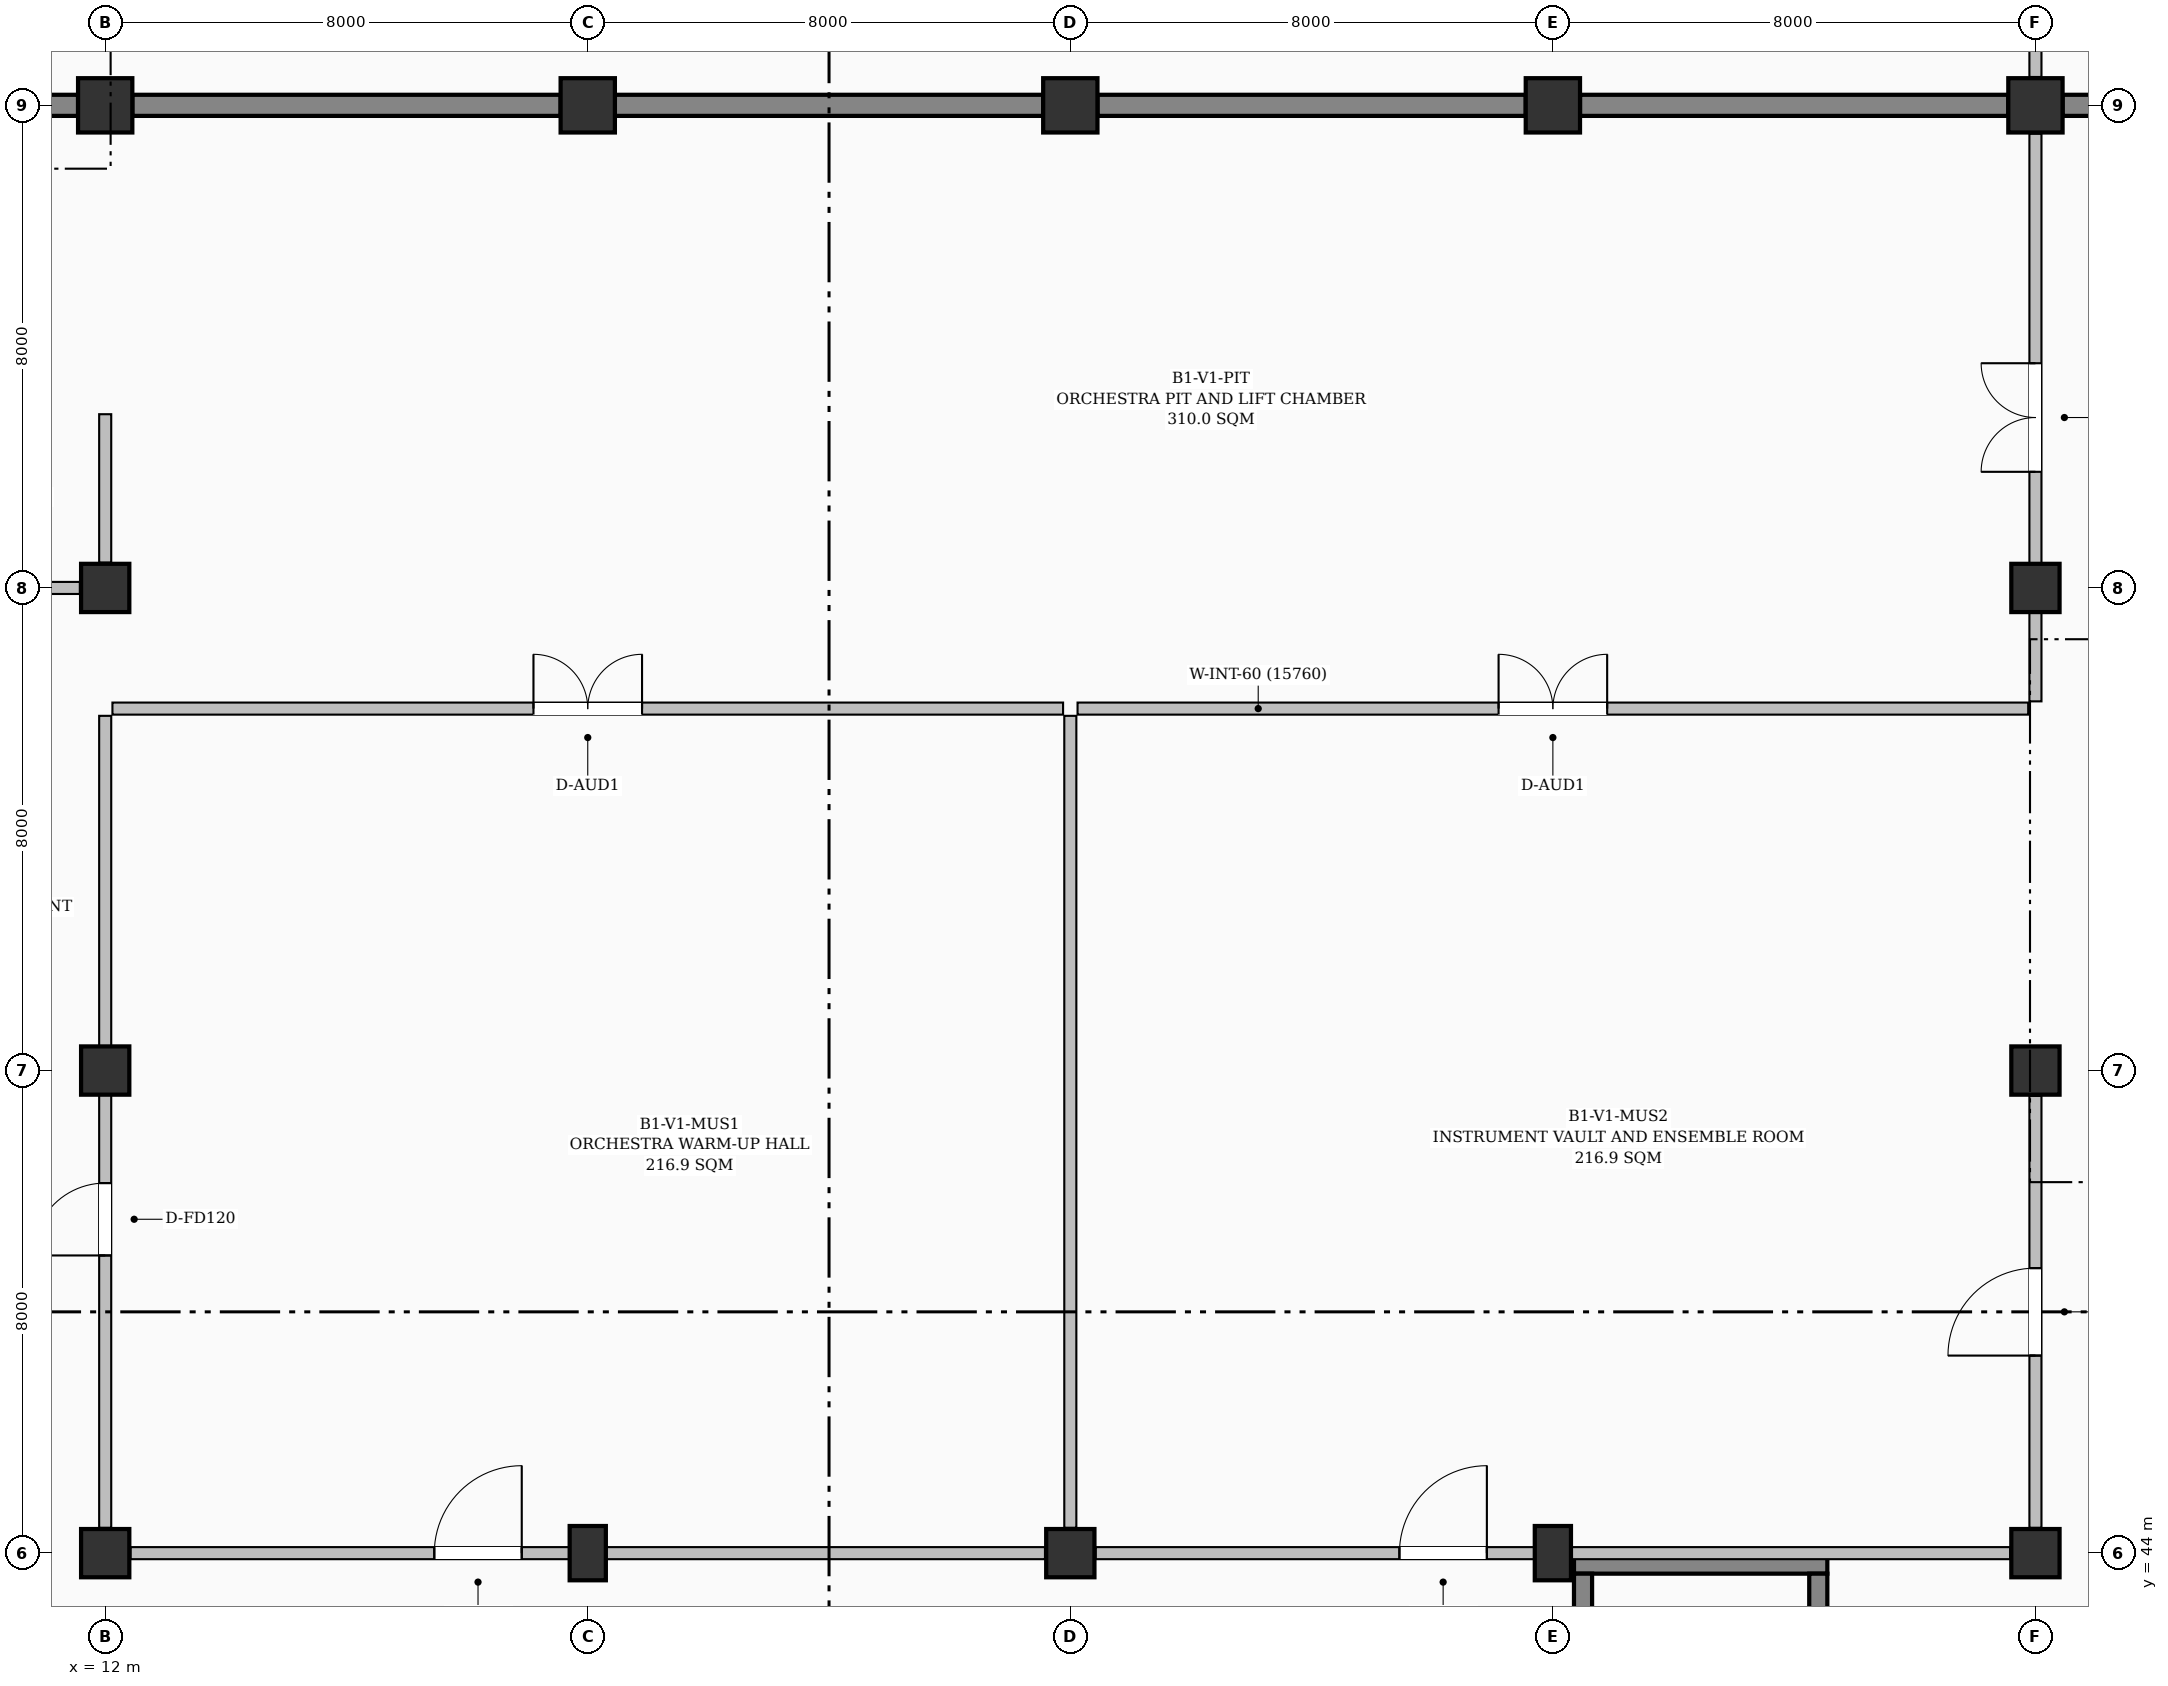
"""IFC4 building model, lengths in metres.
Left out: names, types, materials, properties, quantities, classifications, styles, units other than length and angle.
Written with IfcOpenShell. Run it as: python <this file> out.ifc"""

import sys

from ifc_helpers import new_model, si_unit, direction, frame, frame_2d, origin, origin_2d, place, context, subcontext, project, spatial, rectangle, extrude, element, fill, save


model = new_model("IFC4")
c1 = context("Model", 3, precision=1e-05, world=origin(), true_north=direction((0.0, 1.0)))
c2 = subcontext(c1, "Body", "Model", "MODEL_VIEW")
j1 = project(units=[si_unit("LENGTHUNIT", "METRE"), si_unit("PLANEANGLEUNIT", "RADIAN")], contexts=[c1])
p1 = place(None, origin())
s1 = spatial("IfcSite", under=j1, at=p1, CompositionType="ELEMENT")
p2 = place(p1, origin())
s2 = spatial("IfcBuilding", under=s1, at=p2, CompositionType="ELEMENT")
p3 = place(p2, frame((0.0, 0.0, -4.8)))
s3 = spatial("IfcBuildingStorey", under=s2, at=p3, CompositionType="ELEMENT", Elevation=-4.8)
for number, where, z_axis, x_axis in (
    (1, (12.0, 44.0, -0.38), (0.0, 0.0, 1.0), (1.0, 0.0, 0.0)),
    (2, (12.0, 52.0, -0.38), (0.0, 0.0, 1.0), (1.0, 0.0, 0.0)),
    (3, (12.0, 60.0, -0.38), (0.0, 0.0, 1.0), (1.0, 0.0, 0.0)),
):
    element("IfcColumn", number, at=place(p3, frame(where, z_axis=z_axis, x_axis=x_axis)), inside=s3, PredefinedType="COLUMN", context=c2, shape_type="SweptSolid", body=[
        extrude(rectangle(XDim=0.8, YDim=0.8, at=origin_2d()), origin(), (0.0, 0.0, 1.0), 5.18),
    ])
p4 = place(p3, frame((12.0, 68.0, -0.38), z_axis=(0.0, 0.0, 1.0), x_axis=(1.0, 0.0, 0.0)))
e4 = element("IfcColumn", 4, at=p4, inside=s3, PredefinedType="COLUMN", context=c2, shape_type="SweptSolid", body=[
    extrude(rectangle(XDim=0.9, YDim=0.9, at=origin_2d()), origin(), (0.0, 0.0, 1.0), 5.18),
])
p5 = place(p3, frame((20.0, 44.0, -0.38), z_axis=(0.0, 0.0, 1.0), x_axis=(1.0, 0.0, 0.0)))
e5 = element("IfcColumn", 5, at=p5, inside=s3, PredefinedType="COLUMN", context=c2, shape_type="SweptSolid", body=[
    extrude(rectangle(XDim=0.6, YDim=0.9, at=origin_2d()), origin(), (0.0, 0.0, 1.0), 5.18),
])
p6 = place(p3, frame((20.0, 68.0, -0.38), z_axis=(0.0, 0.0, 1.0), x_axis=(1.0, 0.0, 0.0)))
e6 = element("IfcColumn", 6, at=p6, inside=s3, PredefinedType="COLUMN", context=c2, shape_type="SweptSolid", body=[
    extrude(rectangle(XDim=0.9, YDim=0.9, at=origin_2d()), origin(), (0.0, 0.0, 1.0), 5.18),
])
p7 = place(p3, frame((28.0, 44.0, -0.38), z_axis=(0.0, 0.0, 1.0), x_axis=(1.0, 0.0, 0.0)))
e7 = element("IfcColumn", 7, at=p7, inside=s3, PredefinedType="COLUMN", context=c2, shape_type="SweptSolid", body=[
    extrude(rectangle(XDim=0.8, YDim=0.8, at=origin_2d()), origin(), (0.0, 0.0, 1.0), 5.18),
])
p8 = place(p3, frame((28.0, 68.0, -0.38), z_axis=(0.0, 0.0, 1.0), x_axis=(1.0, 0.0, 0.0)))
e8 = element("IfcColumn", 8, at=p8, inside=s3, PredefinedType="COLUMN", context=c2, shape_type="SweptSolid", body=[
    extrude(rectangle(XDim=0.9, YDim=0.9, at=origin_2d()), origin(), (0.0, 0.0, 1.0), 5.18),
])
p9 = place(p3, frame((36.0, 44.0, -0.38), z_axis=(0.0, 0.0, 1.0), x_axis=(1.0, 0.0, 0.0)))
e9 = element("IfcColumn", 9, at=p9, inside=s3, PredefinedType="COLUMN", context=c2, shape_type="SweptSolid", body=[
    extrude(rectangle(XDim=0.6, YDim=0.9, at=origin_2d()), origin(), (0.0, 0.0, 1.0), 5.18),
])
p10 = place(p3, frame((36.0, 68.0, -0.38), z_axis=(0.0, 0.0, 1.0), x_axis=(1.0, 0.0, 0.0)))
e10 = element("IfcColumn", 10, at=p10, inside=s3, PredefinedType="COLUMN", context=c2, shape_type="SweptSolid", body=[
    extrude(rectangle(XDim=0.9, YDim=0.9, at=origin_2d()), origin(), (0.0, 0.0, 1.0), 5.18),
])
for number, where, z_axis, x_axis in (
    (11, (44.0, 44.0, -0.38), (0.0, 0.0, 1.0), (1.0, 0.0, 0.0)),
    (12, (44.0, 52.0, -0.38), (0.0, 0.0, 1.0), (1.0, 0.0, 0.0)),
    (13, (44.0, 60.0, -0.38), (0.0, 0.0, 1.0), (1.0, 0.0, 0.0)),
):
    element("IfcColumn", number, at=place(p3, frame(where, z_axis=z_axis, x_axis=x_axis)), inside=s3, PredefinedType="COLUMN", context=c2, shape_type="SweptSolid", body=[
        extrude(rectangle(XDim=0.8, YDim=0.8, at=origin_2d()), origin(), (0.0, 0.0, 1.0), 5.18),
    ])
p11 = place(p3, frame((44.0, 68.0, -0.38), z_axis=(0.0, 0.0, 1.0), x_axis=(1.0, 0.0, 0.0)))
e14 = element("IfcColumn", 14, at=p11, inside=s3, PredefinedType="COLUMN", context=c2, shape_type="SweptSolid", body=[
    extrude(rectangle(XDim=0.9, YDim=0.9, at=origin_2d()), origin(), (0.0, 0.0, 1.0), 5.18),
])
p12 = place(p3, frame((4.35, 68.0, 0.0), z_axis=(0.0, 0.0, 1.0), x_axis=(1.0, 0.0, 0.0)))
e15 = element("IfcWall", 15, at=p12, inside=s3, PredefinedType="SHEAR", context=c2, shape_type="SweptSolid", body=[
    extrude(rectangle(XDim=7.2, YDim=0.35, at=frame_2d((3.6, 0.0))), origin(), (0.0, 0.0, 1.0), 4.5),
])
for number, where, z_axis, x_axis in (
    (16, (12.45, 68.0, 0.0), (0.0, 0.0, 1.0), (1.0, 0.0, 0.0)),
    (17, (20.45, 68.0, 0.0), (0.0, 0.0, 1.0), (1.0, 0.0, 0.0)),
    (18, (28.45, 68.0, 0.0), (0.0, 0.0, 1.0), (1.0, 0.0, 0.0)),
    (19, (36.45, 68.0, 0.0), (0.0, 0.0, 1.0), (1.0, 0.0, 0.0)),
):
    element("IfcWall", number, at=place(p3, frame(where, z_axis=z_axis, x_axis=x_axis)), inside=s3, PredefinedType="SHEAR", context=c2, shape_type="SweptSolid", body=[
        extrude(rectangle(XDim=7.1, YDim=0.35, at=frame_2d((3.55, 0.0))), origin(), (0.0, 0.0, 1.0), 4.5),
    ])
p13 = place(p3, frame((44.45, 68.0, 0.0), z_axis=(0.0, 0.0, 1.0), x_axis=(1.0, 0.0, 0.0)))
e20 = element("IfcWall", 20, at=p13, inside=s3, PredefinedType="SHEAR", context=c2, shape_type="SweptSolid", body=[
    extrude(rectangle(XDim=7.2, YDim=0.35, at=frame_2d((3.6, 0.0))), origin(), (0.0, 0.0, 1.0), 4.5),
])
p14 = place(p3, frame((40.55, 43.81, -0.38), z_axis=(0.0, 0.0, 1.0), x_axis=(-1.0, 0.0, 0.0)))
e21 = element("IfcWall", 21, at=p14, inside=s3, PredefinedType="SHEAR", context=c2, shape_type="SweptSolid", body=[
    extrude(rectangle(XDim=4.2, YDim=0.3, at=frame_2d((2.1, 0.0))), origin(), (0.0, 0.0, 1.0), 4.88),
])
p15 = place(p3, frame((36.5, 36.34, -0.38), z_axis=(0.0, 0.0, 1.0), x_axis=(0.0, 1.0, 0.0)))
e22 = element("IfcWall", 22, at=p15, inside=s3, PredefinedType="SHEAR", context=c2, shape_type="SweptSolid", body=[
    extrude(rectangle(XDim=7.32, YDim=0.3, at=frame_2d((3.66, 0.0))), origin(), (0.0, 0.0, 1.0), 4.88),
])
p16 = place(p3, frame((40.4, 36.34, -0.38), z_axis=(0.0, 0.0, 1.0), x_axis=(0.0, 1.0, 0.0)))
e23 = element("IfcWall", 23, at=p16, inside=s3, PredefinedType="SHEAR", context=c2, shape_type="SweptSolid", body=[
    extrude(rectangle(XDim=7.32, YDim=0.3, at=frame_2d((3.66, 0.0))), origin(), (0.0, 0.0, 1.0), 4.88),
])
p17 = place(p16, frame((0.35, 0.0, 0.38)))
e24 = element("IfcOpeningElement", 24, at=p17, cuts=e23, PredefinedType="OPENING", context=c2, shape_type="SweptSolid", body=[
    extrude(rectangle(XDim=1.2, YDim=2.15, at=frame_2d((0.6, 1.075))), frame((0.0, 0.16, 0.0), z_axis=(0.0, -1.0, 0.0), x_axis=(1.0, 0.0, 0.0)), (0.0, 0.0, 1.0), 0.32),
])
p18 = place(p3, frame((12.12, 58.0, 0.0), z_axis=(0.0, 0.0, 1.0), x_axis=(1.0, 0.0, 0.0)))
e25 = element("IfcWall", 25, at=p18, inside=s3, PredefinedType="PARTITIONING", context=c2, shape_type="SweptSolid", body=[
    extrude(rectangle(XDim=15.76, YDim=0.2, at=frame_2d((7.88, 0.0))), origin(), (0.0, 0.0, 1.0), 4.5),
])
p19 = place(p18, frame((6.98, 0.0, 0.0)))
e26 = element("IfcOpeningElement", 26, at=p19, cuts=e25, PredefinedType="OPENING", context=c2, shape_type="SweptSolid", body=[
    extrude(rectangle(XDim=1.8, YDim=2.35, at=frame_2d((0.9, 1.175))), frame((0.0, 0.11, 0.0), z_axis=(0.0, -1.0, 0.0), x_axis=(1.0, 0.0, 0.0)), (0.0, 0.0, 1.0), 0.22),
])
p20 = place(p3, frame((28.12, 58.0, 0.0), z_axis=(0.0, 0.0, 1.0), x_axis=(1.0, 0.0, 0.0)))
e27 = element("IfcWall", 27, at=p20, inside=s3, PredefinedType="PARTITIONING", context=c2, shape_type="SweptSolid", body=[
    extrude(rectangle(XDim=15.76, YDim=0.2, at=frame_2d((7.88, 0.0))), origin(), (0.0, 0.0, 1.0), 4.5),
])
p21 = place(p20, frame((6.98, 0.0, 0.0)))
e28 = element("IfcOpeningElement", 28, at=p21, cuts=e27, PredefinedType="OPENING", context=c2, shape_type="SweptSolid", body=[
    extrude(rectangle(XDim=1.8, YDim=2.35, at=frame_2d((0.9, 1.175))), frame((0.0, 0.11, 0.0), z_axis=(0.0, -1.0, 0.0), x_axis=(1.0, 0.0, 0.0)), (0.0, 0.0, 1.0), 0.22),
])
p22 = place(p3, frame((12.0, 60.42, 0.0), z_axis=(0.0, 0.0, 1.0), x_axis=(0.0, 1.0, 0.0)))
e29 = element("IfcWall", 29, at=p22, inside=s3, PredefinedType="PARTITIONING", context=c2, shape_type="SweptSolid", body=[
    extrude(rectangle(XDim=2.46, YDim=0.2, at=frame_2d((1.23, 0.0))), origin(), (0.0, 0.0, 1.0), 4.125),
])
p23 = place(p3, frame((44.0, 58.12, 0.0), z_axis=(0.0, 0.0, 1.0), x_axis=(0.0, 1.0, 0.0)))
e30 = element("IfcWall", 30, at=p23, inside=s3, PredefinedType="PARTITIONING", context=c2, shape_type="SweptSolid", body=[
    extrude(rectangle(XDim=9.41, YDim=0.2, at=frame_2d((4.705, 0.0))), origin(), (0.0, 0.0, 1.0), 3.885),
])
p24 = place(p23, frame((3.805, 0.0, 0.0)))
e31 = element("IfcOpeningElement", 31, at=p24, cuts=e30, PredefinedType="OPENING", context=c2, shape_type="SweptSolid", body=[
    extrude(rectangle(XDim=1.8, YDim=2.35, at=frame_2d((0.9, 1.175))), frame((0.0, 0.11, 0.0), z_axis=(0.0, -1.0, 0.0), x_axis=(1.0, 0.0, 0.0)), (0.0, 0.0, 1.0), 0.22),
])
p25 = place(p3, frame((28.0, 44.42, 0.0), z_axis=(0.0, 0.0, 1.0), x_axis=(0.0, 1.0, 0.0)))
e32 = element("IfcWall", 32, at=p25, inside=s3, PredefinedType="PARTITIONING", context=c2, shape_type="SweptSolid", body=[
    extrude(rectangle(XDim=13.46, YDim=0.2, at=frame_2d((6.73, 0.0))), origin(), (0.0, 0.0, 1.0), 3.285),
])
p26 = place(p3, frame((12.42, 44.0, 0.0), z_axis=(0.0, 0.0, 1.0), x_axis=(1.0, 0.0, 0.0)))
e33 = element("IfcWall", 33, at=p26, inside=s3, PredefinedType="PARTITIONING", context=c2, shape_type="SweptSolid", body=[
    extrude(rectangle(XDim=15.16, YDim=0.2, at=frame_2d((7.58, 0.0))), origin(), (0.0, 0.0, 1.0), 3.735),
])
p27 = place(p26, frame((5.036, 0.0, 0.0)))
e34 = element("IfcOpeningElement", 34, at=p27, cuts=e33, PredefinedType="OPENING", context=c2, shape_type="SweptSolid", body=[
    extrude(rectangle(XDim=1.45, YDim=2.25, at=frame_2d((0.725, 1.125))), frame((0.0, 0.11, 0.0), z_axis=(0.0, -1.0, 0.0), x_axis=(1.0, 0.0, 0.0)), (0.0, 0.0, 1.0), 0.22),
])
p28 = place(p3, frame((12.0, 44.42, 0.0), z_axis=(0.0, 0.0, 1.0), x_axis=(0.0, 1.0, 0.0)))
e35 = element("IfcWall", 35, at=p28, inside=s3, PredefinedType="PARTITIONING", context=c2, shape_type="SweptSolid", body=[
    extrude(rectangle(XDim=13.46, YDim=0.2, at=frame_2d((6.73, 0.0))), origin(), (0.0, 0.0, 1.0), 4.035),
])
p29 = place(p28, frame((4.515, 0.0, 0.0)))
e36 = element("IfcOpeningElement", 36, at=p29, cuts=e35, PredefinedType="OPENING", context=c2, shape_type="SweptSolid", body=[
    extrude(rectangle(XDim=1.2, YDim=2.2, at=frame_2d((0.6, 1.1))), frame((0.0, 0.11, 0.0), z_axis=(0.0, -1.0, 0.0), x_axis=(1.0, 0.0, 0.0)), (0.0, 0.0, 1.0), 0.22),
])
p30 = place(p3, frame((28.42, 44.0, 0.0), z_axis=(0.0, 0.0, 1.0), x_axis=(1.0, 0.0, 0.0)))
e37 = element("IfcWall", 37, at=p30, inside=s3, PredefinedType="PARTITIONING", context=c2, shape_type="SweptSolid", body=[
    extrude(rectangle(XDim=15.16, YDim=0.2, at=frame_2d((7.58, 0.0))), origin(), (0.0, 0.0, 1.0), 3.635),
])
p31 = place(p30, frame((5.036, 0.0, 0.0)))
e38 = element("IfcOpeningElement", 38, at=p31, cuts=e37, PredefinedType="OPENING", context=c2, shape_type="SweptSolid", body=[
    extrude(rectangle(XDim=1.45, YDim=2.25, at=frame_2d((0.725, 1.125))), frame((0.0, 0.11, 0.0), z_axis=(0.0, -1.0, 0.0), x_axis=(1.0, 0.0, 0.0)), (0.0, 0.0, 1.0), 0.22),
])
p32 = place(p3, frame((44.0, 44.42, 0.0), z_axis=(0.0, 0.0, 1.0), x_axis=(0.0, 1.0, 0.0)))
e39 = element("IfcWall", 39, at=p32, inside=s3, PredefinedType="PARTITIONING", context=c2, shape_type="SweptSolid", body=[
    extrude(rectangle(XDim=7.16, YDim=0.2, at=frame_2d((3.58, 0.0))), origin(), (0.0, 0.0, 1.0), 4.035),
])
p33 = place(p32, frame((2.855, 0.0, 0.0)))
e40 = element("IfcOpeningElement", 40, at=p33, cuts=e39, PredefinedType="OPENING", context=c2, shape_type="SweptSolid", body=[
    extrude(rectangle(XDim=1.45, YDim=2.25, at=frame_2d((0.725, 1.125))), frame((0.0, 0.11, 0.0), z_axis=(0.0, -1.0, 0.0), x_axis=(1.0, 0.0, 0.0)), (0.0, 0.0, 1.0), 0.22),
])
p34 = place(p3, frame((9.52, 60.0, 0.0), z_axis=(0.0, 0.0, 1.0), x_axis=(1.0, 0.0, 0.0)))
e41 = element("IfcWall", 41, at=p34, inside=s3, PredefinedType="PARTITIONING", context=c2, shape_type="SweptSolid", body=[
    extrude(rectangle(XDim=2.06, YDim=0.2, at=frame_2d((1.03, 0.0))), origin(), (0.0, 0.0, 1.0), 3.735),
])
p35 = place(p3, frame((44.0, 68.47, 0.0), z_axis=(0.0, 0.0, 1.0), x_axis=(0.0, 1.0, 0.0)))
e42 = element("IfcWall", 42, at=p35, inside=s3, PredefinedType="PARTITIONING", context=c2, shape_type="SweptSolid", body=[
    extrude(rectangle(XDim=8.41, YDim=0.2, at=frame_2d((4.205, 0.0))), origin(), (0.0, 0.0, 1.0), 4.095),
])
p36 = place(p35, frame((3.305, 0.0, 0.0)))
e43 = element("IfcOpeningElement", 43, at=p36, cuts=e42, PredefinedType="OPENING", context=c2, shape_type="SweptSolid", body=[
    extrude(rectangle(XDim=1.8, YDim=2.35, at=frame_2d((0.9, 1.175))), frame((0.0, 0.11, 0.0), z_axis=(0.0, -1.0, 0.0), x_axis=(1.0, 0.0, 0.0)), (0.0, 0.0, 1.0), 0.22),
])
p37 = place(p19, origin())
e44 = element("IfcDoor", 44, at=p37, inside=s3, OperationType="DOUBLE_DOOR_SINGLE_SWING", PredefinedType="DOOR", context=c2, shape_type="SweptSolid", body=[
    extrude(rectangle(XDim=1.8, YDim=2.35, at=frame_2d((0.9, 1.175))), frame((0.0, 0.025, 0.0), z_axis=(0.0, -1.0, 0.0), x_axis=(1.0, 0.0, 0.0)), (0.0, 0.0, 1.0), 0.05),
])
fill(e26, e44)
p38 = place(p21, origin())
e45 = element("IfcDoor", 45, at=p38, inside=s3, OperationType="DOUBLE_DOOR_SINGLE_SWING", PredefinedType="DOOR", context=c2, shape_type="SweptSolid", body=[
    extrude(rectangle(XDim=1.8, YDim=2.35, at=frame_2d((0.9, 1.175))), frame((0.0, 0.025, 0.0), z_axis=(0.0, -1.0, 0.0), x_axis=(1.0, 0.0, 0.0)), (0.0, 0.0, 1.0), 0.05),
])
fill(e28, e45)
p39 = place(p24, origin())
e46 = element("IfcDoor", 46, at=p39, inside=s3, OperationType="DOUBLE_DOOR_SINGLE_SWING", PredefinedType="DOOR", context=c2, shape_type="SweptSolid", body=[
    extrude(rectangle(XDim=1.8, YDim=2.35, at=frame_2d((0.9, 1.175))), frame((0.0, 0.025, 0.0), z_axis=(0.0, -1.0, 0.0), x_axis=(1.0, 0.0, 0.0)), (0.0, 0.0, 1.0), 0.05),
])
fill(e31, e46)
p40 = place(p27, origin())
e47 = element("IfcDoor", 47, at=p40, inside=s3, OperationType="SINGLE_SWING_RIGHT", PredefinedType="DOOR", context=c2, shape_type="SweptSolid", body=[
    extrude(rectangle(XDim=1.45, YDim=2.25, at=frame_2d((0.725, 1.125))), frame((0.0, 0.025, 0.0), z_axis=(0.0, -1.0, 0.0), x_axis=(1.0, 0.0, 0.0)), (0.0, 0.0, 1.0), 0.05),
])
fill(e34, e47)
p41 = place(p29, origin())
e48 = element("IfcDoor", 48, at=p41, inside=s3, OperationType="SINGLE_SWING_LEFT", PredefinedType="DOOR", context=c2, shape_type="SweptSolid", body=[
    extrude(rectangle(XDim=1.2, YDim=2.2, at=frame_2d((0.6, 1.1))), frame((0.0, 0.025, 0.0), z_axis=(0.0, -1.0, 0.0), x_axis=(1.0, 0.0, 0.0)), (0.0, 0.0, 1.0), 0.05),
])
fill(e36, e48)
p42 = place(p31, origin())
e49 = element("IfcDoor", 49, at=p42, inside=s3, OperationType="SINGLE_SWING_RIGHT", PredefinedType="DOOR", context=c2, shape_type="SweptSolid", body=[
    extrude(rectangle(XDim=1.45, YDim=2.25, at=frame_2d((0.725, 1.125))), frame((0.0, 0.025, 0.0), z_axis=(0.0, -1.0, 0.0), x_axis=(1.0, 0.0, 0.0)), (0.0, 0.0, 1.0), 0.05),
])
fill(e38, e49)
p43 = place(p33, origin())
e50 = element("IfcDoor", 50, at=p43, inside=s3, OperationType="SINGLE_SWING_LEFT", PredefinedType="DOOR", context=c2, shape_type="SweptSolid", body=[
    extrude(rectangle(XDim=1.45, YDim=2.25, at=frame_2d((0.725, 1.125))), frame((0.0, 0.025, 0.0), z_axis=(0.0, -1.0, 0.0), x_axis=(1.0, 0.0, 0.0)), (0.0, 0.0, 1.0), 0.05),
])
fill(e40, e50)
save(model, sys.argv[1])
